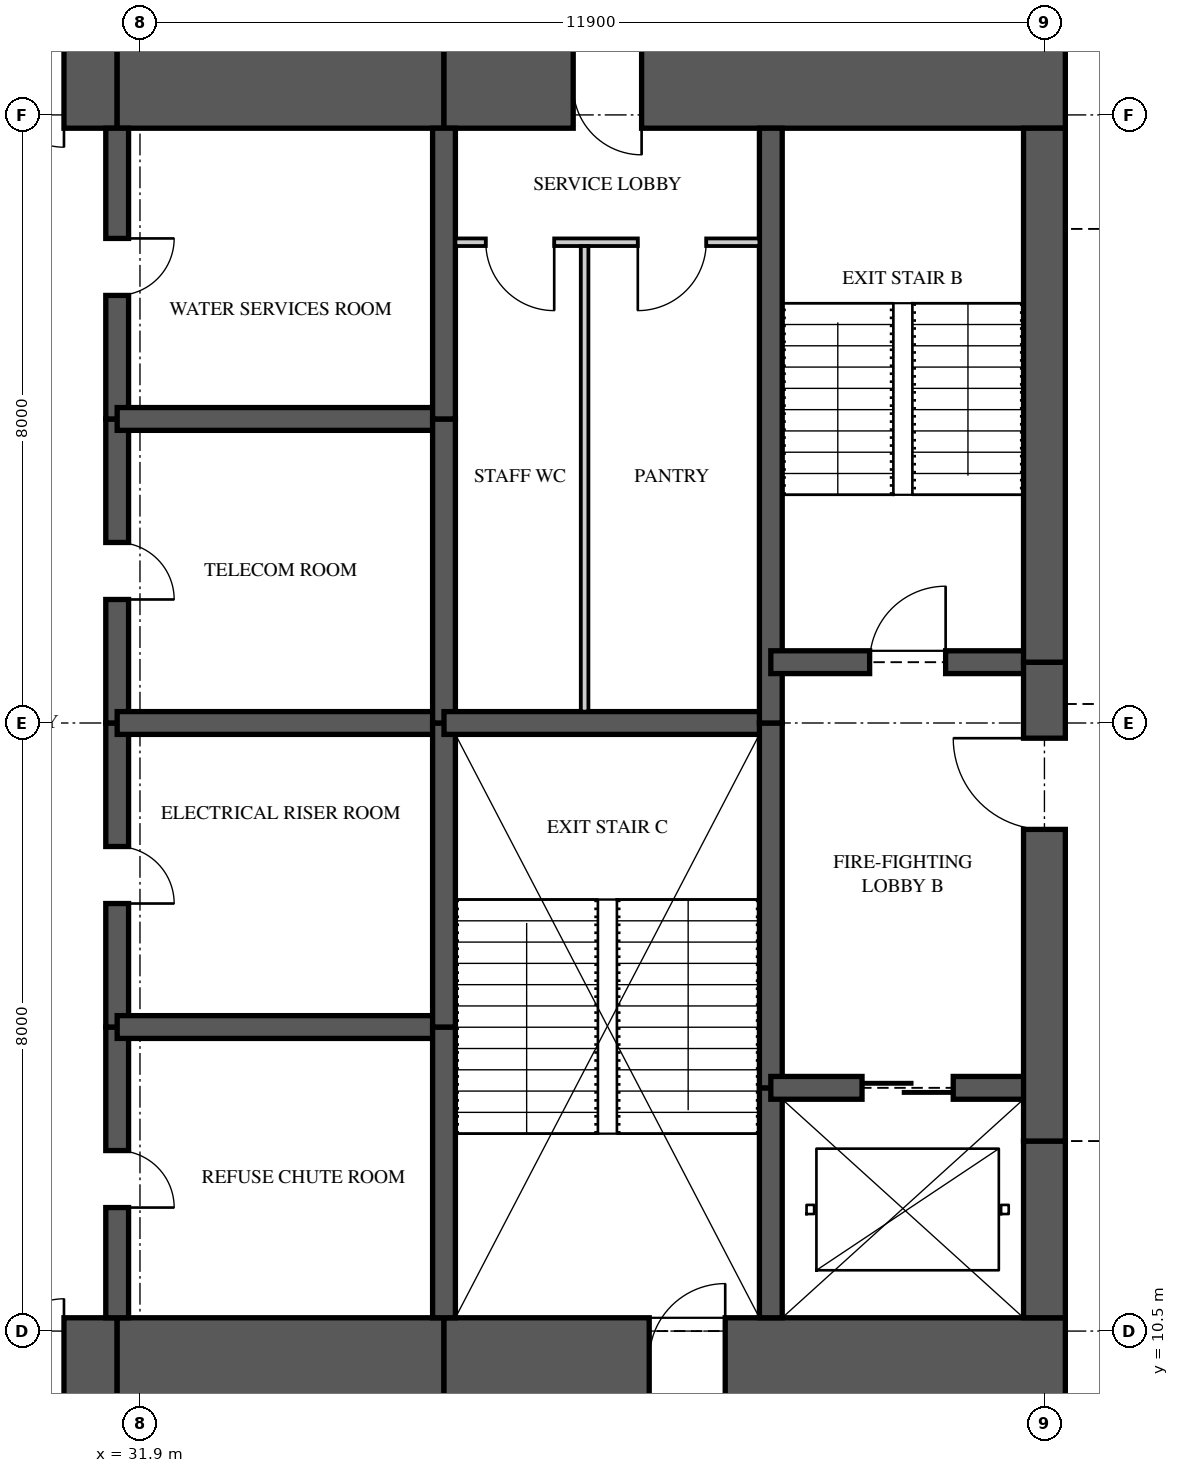
"""IFC4 building model, lengths in metres.
Left out: names, types, materials, properties, quantities, classifications, styles, units other than length and angle.
Written with IfcOpenShell. Run it as: python <this file> out.ifc"""

import sys

from ifc_helpers import new_model, si_unit, direction, frame, frame_2d, origin, place, context, subcontext, project, spatial, rectangle, extrude, element, fill, save


model = new_model("IFC4")
c1 = context("Model", 3, precision=1e-05, world=origin(), true_north=direction((0.0, 1.0)))
c2 = subcontext(c1, "Body", "Model", "MODEL_VIEW")
j1 = project(units=[si_unit("LENGTHUNIT", "METRE"), si_unit("PLANEANGLEUNIT", "RADIAN")], contexts=[c1])
p1 = place(None, origin())
s1 = spatial("IfcSite", under=j1, at=p1, CompositionType="ELEMENT")
p2 = place(p1, origin())
s2 = spatial("IfcBuilding", under=s1, at=p2, CompositionType="ELEMENT")
p3 = place(p2, frame((0.0, 0.0, 238.95)))
s3 = spatial("IfcBuildingStorey", under=s2, at=p3, CompositionType="ELEMENT", Elevation=238.95)
p4 = place(p3, frame((26.0, 10.125, 0.0), z_axis=(0.0, 0.0, 1.0), x_axis=(1.0, 0.0, 0.0)))
e1 = element("IfcWall", 1, at=p4, inside=s3, PredefinedType="SHEAR", context=c2, shape_type="SweptSolid", body=[
    extrude(rectangle(XDim=5.6, YDim=1.1, at=frame_2d((2.8, 0.0))), origin(), (0.0, 0.0, 1.0), 3.5),
])
p5 = place(p4, frame((3.3, 0.0, 0.0)))
e2 = element("IfcOpeningElement", 2, at=p5, cuts=e1, PredefinedType="OPENING", context=c2, shape_type="SweptSolid", body=[
    extrude(rectangle(XDim=1.6, YDim=2.1, at=frame_2d((0.8, 1.05))), frame((0.0, 0.56, 0.0), z_axis=(0.0, -1.0, 0.0), x_axis=(1.0, 0.0, 0.0)), (0.0, 0.0, 1.0), 1.12),
])
p6 = place(p3, frame((31.6, 10.125, 0.0), z_axis=(0.0, 0.0, 1.0), x_axis=(1.0, 0.0, 0.0)))
e3 = element("IfcWall", 3, at=p6, inside=s3, PredefinedType="SHEAR", context=c2, shape_type="SweptSolid", body=[
    extrude(rectangle(XDim=4.3, YDim=1.1, at=frame_2d((2.15, 0.0))), origin(), (0.0, 0.0, 1.0), 3.5),
])
p7 = place(p3, frame((35.9, 10.125, 0.0), z_axis=(0.0, 0.0, 1.0), x_axis=(1.0, 0.0, 0.0)))
e4 = element("IfcWall", 4, at=p7, inside=s3, PredefinedType="SHEAR", context=c2, shape_type="SweptSolid", body=[
    extrude(rectangle(XDim=8.175, YDim=1.1, at=frame_2d((4.087, 0.0))), origin(), (0.0, 0.0, 1.0), 3.5),
])
p8 = place(p7, frame((2.7, 0.0, 0.0)))
e5 = element("IfcOpeningElement", 5, at=p8, cuts=e4, PredefinedType="OPENING", context=c2, shape_type="SweptSolid", body=[
    extrude(rectangle(XDim=1.0, YDim=2.1, at=frame_2d((0.5, 1.05))), frame((0.0, 0.56, 0.0), z_axis=(0.0, -1.0, 0.0), x_axis=(1.0, 0.0, 0.0)), (0.0, 0.0, 1.0), 1.12),
])
p9 = place(p3, frame((44.075, 26.875, 0.0), z_axis=(0.0, 0.0, 1.0), x_axis=(-1.0, 0.0, 0.0)))
e6 = element("IfcWall", 6, at=p9, inside=s3, PredefinedType="SHEAR", context=c2, shape_type="SweptSolid", body=[
    extrude(rectangle(XDim=8.175, YDim=1.1, at=frame_2d((4.087, 0.0))), origin(), (0.0, 0.0, 1.0), 3.5),
])
p10 = place(p9, frame((5.575, 0.0, 0.0)))
e7 = element("IfcOpeningElement", 7, at=p10, cuts=e6, PredefinedType="OPENING", context=c2, shape_type="SweptSolid", body=[
    extrude(rectangle(XDim=0.9, YDim=2.1, at=frame_2d((0.45, 1.05))), frame((0.0, 0.56, 0.0), z_axis=(0.0, -1.0, 0.0), x_axis=(1.0, 0.0, 0.0)), (0.0, 0.0, 1.0), 1.12),
])
p11 = place(p3, frame((35.9, 26.875, 0.0), z_axis=(0.0, 0.0, 1.0), x_axis=(-1.0, 0.0, 0.0)))
e8 = element("IfcWall", 8, at=p11, inside=s3, PredefinedType="SHEAR", context=c2, shape_type="SweptSolid", body=[
    extrude(rectangle(XDim=4.3, YDim=1.1, at=frame_2d((2.15, 0.0))), origin(), (0.0, 0.0, 1.0), 3.5),
])
p12 = place(p3, frame((31.6, 26.875, 0.0), z_axis=(0.0, 0.0, 1.0), x_axis=(-1.0, 0.0, 0.0)))
e9 = element("IfcWall", 9, at=p12, inside=s3, PredefinedType="SHEAR", context=c2, shape_type="SweptSolid", body=[
    extrude(rectangle(XDim=5.6, YDim=1.1, at=frame_2d((2.8, 0.0))), origin(), (0.0, 0.0, 1.0), 3.5),
])
p13 = place(p12, frame((0.7, 0.0, 0.0)))
e10 = element("IfcOpeningElement", 10, at=p13, cuts=e9, PredefinedType="OPENING", context=c2, shape_type="SweptSolid", body=[
    extrude(rectangle(XDim=1.6, YDim=2.1, at=frame_2d((0.8, 1.05))), frame((0.0, 0.56, 0.0), z_axis=(0.0, -1.0, 0.0), x_axis=(1.0, 0.0, 0.0)), (0.0, 0.0, 1.0), 1.12),
])
p14 = place(p3, frame((43.8, 10.675, 0.0), z_axis=(0.0, 0.0, 1.0), x_axis=(0.0, 1.0, 0.0)))
e11 = element("IfcWall", 11, at=p14, inside=s3, PredefinedType="SHEAR", context=c2, shape_type="SweptSolid", body=[
    extrude(rectangle(XDim=2.325, YDim=0.55, at=frame_2d((1.163, 0.0))), origin(), (0.0, 0.0, 1.0), 3.5),
])
p15 = place(p3, frame((43.8, 13.0, 0.0), z_axis=(0.0, 0.0, 1.0), x_axis=(0.0, 1.0, 0.0)))
e12 = element("IfcWall", 12, at=p15, inside=s3, PredefinedType="SHEAR", context=c2, shape_type="SweptSolid", body=[
    extrude(rectangle(XDim=6.3, YDim=0.55, at=frame_2d((3.15, 0.0))), origin(), (0.0, 0.0, 1.0), 3.5),
])
p16 = place(p15, frame((4.1, 0.0, 0.0)))
e13 = element("IfcOpeningElement", 13, at=p16, cuts=e12, PredefinedType="OPENING", context=c2, shape_type="SweptSolid", body=[
    extrude(rectangle(XDim=1.2, YDim=2.2, at=frame_2d((0.6, 1.1))), frame((0.0, 0.285, 0.0), z_axis=(0.0, -1.0, 0.0), x_axis=(1.0, 0.0, 0.0)), (0.0, 0.0, 1.0), 0.57),
])
p17 = place(p3, frame((43.8, 19.3, 0.0), z_axis=(0.0, 0.0, 1.0), x_axis=(0.0, 1.0, 0.0)))
e14 = element("IfcWall", 14, at=p17, inside=s3, PredefinedType="SHEAR", context=c2, shape_type="SweptSolid", body=[
    extrude(rectangle(XDim=7.025, YDim=0.55, at=frame_2d((3.512, 0.0))), origin(), (0.0, 0.0, 1.0), 3.5),
])
p18 = place(p3, frame((31.6, 10.675, 0.0), z_axis=(0.0, 0.0, 1.0), x_axis=(0.0, 1.0, 0.0)))
e15 = element("IfcWall", 15, at=p18, inside=s3, PredefinedType="SHEAR", context=c2, shape_type="SweptSolid", body=[
    extrude(rectangle(XDim=3.825, YDim=0.3, at=frame_2d((1.913, 0.0))), origin(), (0.0, 0.0, 1.0), 3.5),
])
p19 = place(p18, frame((1.45, 0.0, 0.0)))
e16 = element("IfcOpeningElement", 16, at=p19, cuts=e15, PredefinedType="OPENING", context=c2, shape_type="SweptSolid", body=[
    extrude(rectangle(XDim=0.75, YDim=2.1, at=frame_2d((0.375, 1.05))), frame((0.0, 0.16, 0.0), z_axis=(0.0, -1.0, 0.0), x_axis=(1.0, 0.0, 0.0)), (0.0, 0.0, 1.0), 0.32),
])
p20 = place(p3, frame((31.6, 14.5, 0.0), z_axis=(0.0, 0.0, 1.0), x_axis=(0.0, 1.0, 0.0)))
e17 = element("IfcWall", 17, at=p20, inside=s3, PredefinedType="SHEAR", context=c2, shape_type="SweptSolid", body=[
    extrude(rectangle(XDim=4.0, YDim=0.3, at=frame_2d((2.0, 0.0))), origin(), (0.0, 0.0, 1.0), 3.5),
])
p21 = place(p20, frame((1.625, 0.0, 0.0)))
e18 = element("IfcOpeningElement", 18, at=p21, cuts=e17, PredefinedType="OPENING", context=c2, shape_type="SweptSolid", body=[
    extrude(rectangle(XDim=0.75, YDim=2.1, at=frame_2d((0.375, 1.05))), frame((0.0, 0.16, 0.0), z_axis=(0.0, -1.0, 0.0), x_axis=(1.0, 0.0, 0.0)), (0.0, 0.0, 1.0), 0.32),
])
p22 = place(p3, frame((31.6, 18.5, 0.0), z_axis=(0.0, 0.0, 1.0), x_axis=(0.0, 1.0, 0.0)))
e19 = element("IfcWall", 19, at=p22, inside=s3, PredefinedType="SHEAR", context=c2, shape_type="SweptSolid", body=[
    extrude(rectangle(XDim=4.0, YDim=0.3, at=frame_2d((2.0, 0.0))), origin(), (0.0, 0.0, 1.0), 3.5),
])
p23 = place(p22, frame((1.625, 0.0, 0.0)))
e20 = element("IfcOpeningElement", 20, at=p23, cuts=e19, PredefinedType="OPENING", context=c2, shape_type="SweptSolid", body=[
    extrude(rectangle(XDim=0.75, YDim=2.1, at=frame_2d((0.375, 1.05))), frame((0.0, 0.16, 0.0), z_axis=(0.0, -1.0, 0.0), x_axis=(1.0, 0.0, 0.0)), (0.0, 0.0, 1.0), 0.32),
])
p24 = place(p3, frame((31.6, 22.5, 0.0), z_axis=(0.0, 0.0, 1.0), x_axis=(0.0, 1.0, 0.0)))
e21 = element("IfcWall", 21, at=p24, inside=s3, PredefinedType="SHEAR", context=c2, shape_type="SweptSolid", body=[
    extrude(rectangle(XDim=3.825, YDim=0.3, at=frame_2d((1.913, 0.0))), origin(), (0.0, 0.0, 1.0), 3.5),
])
p25 = place(p24, frame((1.625, 0.0, 0.0)))
e22 = element("IfcOpeningElement", 22, at=p25, cuts=e21, PredefinedType="OPENING", context=c2, shape_type="SweptSolid", body=[
    extrude(rectangle(XDim=0.75, YDim=2.1, at=frame_2d((0.375, 1.05))), frame((0.0, 0.16, 0.0), z_axis=(0.0, -1.0, 0.0), x_axis=(1.0, 0.0, 0.0)), (0.0, 0.0, 1.0), 0.32),
])
p26 = place(p3, frame((35.9, 10.675, 0.0), z_axis=(0.0, 0.0, 1.0), x_axis=(0.0, 1.0, 0.0)))
e23 = element("IfcWall", 23, at=p26, inside=s3, PredefinedType="SHEAR", context=c2, shape_type="SweptSolid", body=[
    extrude(rectangle(XDim=3.825, YDim=0.3, at=frame_2d((1.913, 0.0))), origin(), (0.0, 0.0, 1.0), 3.5),
])
for number, where, z_axis, x_axis in (
    (24, (35.9, 14.5, 0.0), (0.0, 0.0, 1.0), (0.0, 1.0, 0.0)),
    (25, (35.9, 18.5, 0.0), (0.0, 0.0, 1.0), (0.0, 1.0, 0.0)),
):
    element("IfcWall", number, at=place(p3, frame(where, z_axis=z_axis, x_axis=x_axis)), inside=s3, PredefinedType="SHEAR", context=c2, shape_type="SweptSolid", body=[
        extrude(rectangle(XDim=4.0, YDim=0.3, at=frame_2d((2.0, 0.0))), origin(), (0.0, 0.0, 1.0), 3.5),
    ])
p27 = place(p3, frame((35.9, 22.5, 0.0), z_axis=(0.0, 0.0, 1.0), x_axis=(0.0, 1.0, 0.0)))
e26 = element("IfcWall", 26, at=p27, inside=s3, PredefinedType="SHEAR", context=c2, shape_type="SweptSolid", body=[
    extrude(rectangle(XDim=3.825, YDim=0.3, at=frame_2d((1.913, 0.0))), origin(), (0.0, 0.0, 1.0), 3.5),
])
p28 = place(p3, frame((40.2, 10.675, 0.0), z_axis=(0.0, 0.0, 1.0), x_axis=(0.0, 1.0, 0.0)))
e27 = element("IfcWall", 27, at=p28, inside=s3, PredefinedType="SHEAR", context=c2, shape_type="SweptSolid", body=[
    extrude(rectangle(XDim=3.025, YDim=0.3, at=frame_2d((1.512, 0.0))), origin(), (0.0, 0.0, 1.0), 3.5),
])
p29 = place(p3, frame((40.2, 13.7, 0.0), z_axis=(0.0, 0.0, 1.0), x_axis=(0.0, 1.0, 0.0)))
e28 = element("IfcWall", 28, at=p29, inside=s3, PredefinedType="SHEAR", context=c2, shape_type="SweptSolid", body=[
    extrude(rectangle(XDim=4.8, YDim=0.3, at=frame_2d((2.4, 0.0))), origin(), (0.0, 0.0, 1.0), 3.5),
])
p30 = place(p3, frame((40.2, 18.5, 0.0), z_axis=(0.0, 0.0, 1.0), x_axis=(0.0, 1.0, 0.0)))
e29 = element("IfcWall", 29, at=p30, inside=s3, PredefinedType="SHEAR", context=c2, shape_type="SweptSolid", body=[
    extrude(rectangle(XDim=7.825, YDim=0.3, at=frame_2d((3.913, 0.0))), origin(), (0.0, 0.0, 1.0), 3.5),
])
for number, where, z_axis, x_axis in (
    (30, (31.6, 14.5, 0.0), (0.0, 0.0, 1.0), (1.0, 0.0, 0.0)),
    (31, (31.6, 18.5, 0.0), (0.0, 0.0, 1.0), (1.0, 0.0, 0.0)),
    (32, (31.6, 22.5, 0.0), (0.0, 0.0, 1.0), (1.0, 0.0, 0.0)),
):
    element("IfcWall", number, at=place(p3, frame(where, z_axis=z_axis, x_axis=x_axis)), inside=s3, PredefinedType="SHEAR", context=c2, shape_type="SweptSolid", body=[
        extrude(rectangle(XDim=4.3, YDim=0.3, at=frame_2d((2.15, 0.0))), origin(), (0.0, 0.0, 1.0), 3.5),
    ])
p31 = place(p3, frame((35.9, 18.5, 0.0), z_axis=(0.0, 0.0, 1.0), x_axis=(1.0, 0.0, 0.0)))
e33 = element("IfcWall", 33, at=p31, inside=s3, PredefinedType="SHEAR", context=c2, shape_type="SweptSolid", body=[
    extrude(rectangle(XDim=4.3, YDim=0.3, at=frame_2d((2.15, 0.0))), origin(), (0.0, 0.0, 1.0), 3.5),
])
p32 = place(p3, frame((40.2, 13.7, 0.0), z_axis=(0.0, 0.0, 1.0), x_axis=(1.0, 0.0, 0.0)))
e34 = element("IfcWall", 34, at=p32, inside=s3, PredefinedType="SHEAR", context=c2, shape_type="SweptSolid", body=[
    extrude(rectangle(XDim=3.6, YDim=0.3, at=frame_2d((1.8, 0.0))), origin(), (0.0, 0.0, 1.0), 3.5),
])
p33 = place(p32, frame((1.2, 0.0, 0.0)))
e35 = element("IfcOpeningElement", 35, at=p33, cuts=e34, PredefinedType="OPENING", context=c2, shape_type="SweptSolid", body=[
    extrude(rectangle(XDim=1.2, YDim=2.1, at=frame_2d((0.6, 1.05))), frame((0.0, 0.16, 0.0), z_axis=(0.0, -1.0, 0.0), x_axis=(1.0, 0.0, 0.0)), (0.0, 0.0, 1.0), 0.32),
])
p34 = place(p3, frame((40.2, 19.3, 0.0), z_axis=(0.0, 0.0, 1.0), x_axis=(1.0, 0.0, 0.0)))
e36 = element("IfcWall", 36, at=p34, inside=s3, PredefinedType="SHEAR", context=c2, shape_type="SweptSolid", body=[
    extrude(rectangle(XDim=3.6, YDim=0.3, at=frame_2d((1.8, 0.0))), origin(), (0.0, 0.0, 1.0), 3.5),
])
p35 = place(p34, frame((1.3, 0.0, 0.0)))
e37 = element("IfcOpeningElement", 37, at=p35, cuts=e36, PredefinedType="OPENING", context=c2, shape_type="SweptSolid", body=[
    extrude(rectangle(XDim=1.0, YDim=2.1, at=frame_2d((0.5, 1.05))), frame((0.0, 0.16, 0.0), z_axis=(0.0, -1.0, 0.0), x_axis=(1.0, 0.0, 0.0)), (0.0, 0.0, 1.0), 0.32),
])
p36 = place(p3, frame((36.05, 24.825, 0.0), z_axis=(0.0, 0.0, 1.0), x_axis=(1.0, 0.0, 0.0)))
e38 = element("IfcWall", 38, at=p36, inside=s3, PredefinedType="PARTITIONING", context=c2, shape_type="SweptSolid", body=[
    extrude(rectangle(XDim=4.0, YDim=0.1, at=frame_2d((2.0, 0.0))), origin(), (0.0, 0.0, 1.0), 3.26),
])
p37 = place(p36, frame((0.4, 0.0, 0.0)))
e39 = element("IfcOpeningElement", 39, at=p37, cuts=e38, PredefinedType="OPENING", context=c2, shape_type="SweptSolid", body=[
    extrude(rectangle(XDim=0.9, YDim=2.1, at=frame_2d((0.45, 1.05))), frame((0.0, 0.06, 0.0), z_axis=(0.0, -1.0, 0.0), x_axis=(1.0, 0.0, 0.0)), (0.0, 0.0, 1.0), 0.12),
])
p38 = place(p36, frame((2.4, 0.0, 0.0)))
e40 = element("IfcOpeningElement", 40, at=p38, cuts=e38, PredefinedType="OPENING", context=c2, shape_type="SweptSolid", body=[
    extrude(rectangle(XDim=0.9, YDim=2.1, at=frame_2d((0.45, 1.05))), frame((0.0, 0.06, 0.0), z_axis=(0.0, -1.0, 0.0), x_axis=(1.0, 0.0, 0.0)), (0.0, 0.0, 1.0), 0.12),
])
p39 = place(p3, frame((37.75, 18.65, 0.0), z_axis=(0.0, 0.0, 1.0), x_axis=(0.0, 1.0, 0.0)))
e41 = element("IfcWall", 41, at=p39, inside=s3, PredefinedType="PARTITIONING", context=c2, shape_type="SweptSolid", body=[
    extrude(rectangle(XDim=6.125, YDim=0.1, at=frame_2d((3.062, 0.0))), origin(), (0.0, 0.0, 1.0), 3.26),
])
p40 = place(p37, frame((0.9, 0.0, 0.0), z_axis=(0.0, 0.0, 1.0), x_axis=(-1.0, 0.0, 0.0)))
e42 = element("IfcDoor", 42, at=p40, inside=s3, OperationType="SINGLE_SWING_LEFT", PredefinedType="DOOR", context=c2, shape_type="SweptSolid", body=[
    extrude(rectangle(XDim=0.9, YDim=2.1, at=frame_2d((0.45, 1.05))), frame((0.0, 0.025, 0.0), z_axis=(0.0, -1.0, 0.0), x_axis=(1.0, 0.0, 0.0)), (0.0, 0.0, 1.0), 0.05),
])
fill(e39, e42)
p41 = place(p38, frame((0.9, 0.0, 0.0), z_axis=(0.0, 0.0, 1.0), x_axis=(-1.0, 0.0, 0.0)))
e43 = element("IfcDoor", 43, at=p41, inside=s3, OperationType="SINGLE_SWING_RIGHT", PredefinedType="DOOR", context=c2, shape_type="SweptSolid", body=[
    extrude(rectangle(XDim=0.9, YDim=2.1, at=frame_2d((0.45, 1.05))), frame((0.0, 0.025, 0.0), z_axis=(0.0, -1.0, 0.0), x_axis=(1.0, 0.0, 0.0)), (0.0, 0.0, 1.0), 0.05),
])
fill(e40, e43)
p42 = place(p35, origin())
e44 = element("IfcDoor", 44, at=p42, inside=s3, OperationType="SINGLE_SWING_RIGHT", PredefinedType="DOOR", context=c2, shape_type="SweptSolid", body=[
    extrude(rectangle(XDim=1.0, YDim=2.1, at=frame_2d((0.5, 1.05))), frame((0.0, 0.025, 0.0), z_axis=(0.0, -1.0, 0.0), x_axis=(1.0, 0.0, 0.0)), (0.0, 0.0, 1.0), 0.05),
])
fill(e37, e44)
p43 = place(p16, origin())
e45 = element("IfcDoor", 45, at=p43, inside=s3, OperationType="SINGLE_SWING_RIGHT", PredefinedType="DOOR", context=c2, shape_type="SweptSolid", body=[
    extrude(rectangle(XDim=1.2, YDim=2.2, at=frame_2d((0.6, 1.1))), frame((0.0, 0.025, 0.0), z_axis=(0.0, -1.0, 0.0), x_axis=(1.0, 0.0, 0.0)), (0.0, 0.0, 1.0), 0.05),
])
fill(e13, e45)
p44 = place(p33, origin())
e46 = element("IfcDoor", 46, at=p44, inside=s3, OperationType="SLIDING_TO_LEFT", PredefinedType="DOOR", context=c2, shape_type="SweptSolid", body=[
    extrude(rectangle(XDim=1.2, YDim=2.1, at=frame_2d((0.6, 1.05))), frame((0.0, 0.025, 0.0), z_axis=(0.0, -1.0, 0.0), x_axis=(1.0, 0.0, 0.0)), (0.0, 0.0, 1.0), 0.05),
])
fill(e35, e46)
p45 = place(p5, origin())
e47 = element("IfcDoor", 47, at=p45, inside=s3, OperationType="DOUBLE_DOOR_SINGLE_SWING", PredefinedType="DOOR", context=c2, shape_type="SweptSolid", body=[
    extrude(rectangle(XDim=1.6, YDim=2.1, at=frame_2d((0.8, 1.05))), frame((0.0, 0.025, 0.0), z_axis=(0.0, -1.0, 0.0), x_axis=(1.0, 0.0, 0.0)), (0.0, 0.0, 1.0), 0.05),
])
fill(e2, e47)
p46 = place(p13, origin())
e48 = element("IfcDoor", 48, at=p46, inside=s3, OperationType="DOUBLE_DOOR_SINGLE_SWING", PredefinedType="DOOR", context=c2, shape_type="SweptSolid", body=[
    extrude(rectangle(XDim=1.6, YDim=2.1, at=frame_2d((0.8, 1.05))), frame((0.0, 0.025, 0.0), z_axis=(0.0, -1.0, 0.0), x_axis=(1.0, 0.0, 0.0)), (0.0, 0.0, 1.0), 0.05),
])
fill(e10, e48)
p47 = place(p19, frame((0.75, 0.0, 0.0), z_axis=(0.0, 0.0, 1.0), x_axis=(-1.0, 0.0, 0.0)))
e49 = element("IfcDoor", 49, at=p47, inside=s3, OperationType="SINGLE_SWING_RIGHT", PredefinedType="DOOR", context=c2, shape_type="SweptSolid", body=[
    extrude(rectangle(XDim=0.75, YDim=2.1, at=frame_2d((0.375, 1.05))), frame((0.0, 0.025, 0.0), z_axis=(0.0, -1.0, 0.0), x_axis=(1.0, 0.0, 0.0)), (0.0, 0.0, 1.0), 0.05),
])
fill(e16, e49)
p48 = place(p21, frame((0.75, 0.0, 0.0), z_axis=(0.0, 0.0, 1.0), x_axis=(-1.0, 0.0, 0.0)))
e50 = element("IfcDoor", 50, at=p48, inside=s3, OperationType="SINGLE_SWING_RIGHT", PredefinedType="DOOR", context=c2, shape_type="SweptSolid", body=[
    extrude(rectangle(XDim=0.75, YDim=2.1, at=frame_2d((0.375, 1.05))), frame((0.0, 0.025, 0.0), z_axis=(0.0, -1.0, 0.0), x_axis=(1.0, 0.0, 0.0)), (0.0, 0.0, 1.0), 0.05),
])
fill(e18, e50)
p49 = place(p23, frame((0.75, 0.0, 0.0), z_axis=(0.0, 0.0, 1.0), x_axis=(-1.0, 0.0, 0.0)))
e51 = element("IfcDoor", 51, at=p49, inside=s3, OperationType="SINGLE_SWING_RIGHT", PredefinedType="DOOR", context=c2, shape_type="SweptSolid", body=[
    extrude(rectangle(XDim=0.75, YDim=2.1, at=frame_2d((0.375, 1.05))), frame((0.0, 0.025, 0.0), z_axis=(0.0, -1.0, 0.0), x_axis=(1.0, 0.0, 0.0)), (0.0, 0.0, 1.0), 0.05),
])
fill(e20, e51)
p50 = place(p25, frame((0.75, 0.0, 0.0), z_axis=(0.0, 0.0, 1.0), x_axis=(-1.0, 0.0, 0.0)))
e52 = element("IfcDoor", 52, at=p50, inside=s3, OperationType="SINGLE_SWING_LEFT", PredefinedType="DOOR", context=c2, shape_type="SweptSolid", body=[
    extrude(rectangle(XDim=0.75, YDim=2.1, at=frame_2d((0.375, 1.05))), frame((0.0, 0.025, 0.0), z_axis=(0.0, -1.0, 0.0), x_axis=(1.0, 0.0, 0.0)), (0.0, 0.0, 1.0), 0.05),
])
fill(e22, e52)
p51 = place(p8, origin())
e53 = element("IfcDoor", 53, at=p51, inside=s3, OperationType="SINGLE_SWING_RIGHT", PredefinedType="DOOR", context=c2, shape_type="SweptSolid", body=[
    extrude(rectangle(XDim=1.0, YDim=2.1, at=frame_2d((0.5, 1.05))), frame((0.0, 0.025, 0.0), z_axis=(0.0, -1.0, 0.0), x_axis=(1.0, 0.0, 0.0)), (0.0, 0.0, 1.0), 0.05),
])
fill(e5, e53)
p52 = place(p10, origin())
e54 = element("IfcDoor", 54, at=p52, inside=s3, OperationType="SINGLE_SWING_LEFT", PredefinedType="DOOR", context=c2, shape_type="SweptSolid", body=[
    extrude(rectangle(XDim=0.9, YDim=2.1, at=frame_2d((0.45, 1.05))), frame((0.0, 0.47, 0.0), z_axis=(0.0, -1.0, 0.0), x_axis=(1.0, 0.0, 0.0)), (0.0, 0.0, 1.0), 0.8),
])
fill(e7, e54)
save(model, sys.argv[1])
